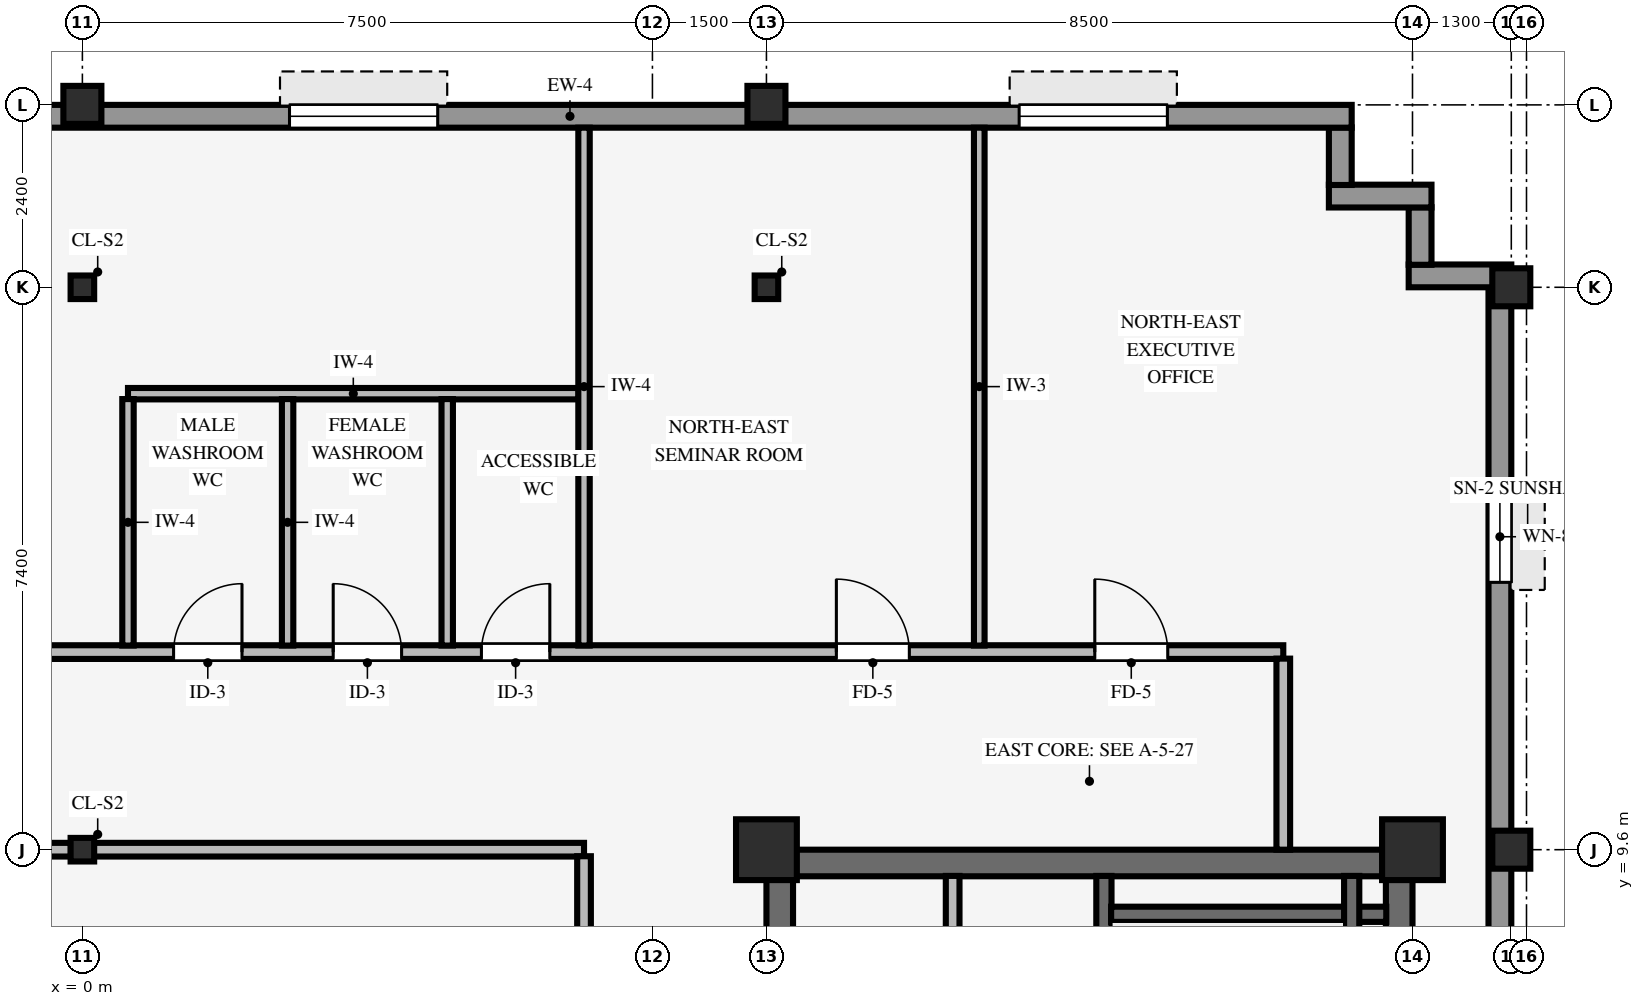
"""IFC4 building model, lengths in metres.
Left out: names, types, materials, properties, quantities, classifications, styles, units other than length and angle.
Written with IfcOpenShell. Run it as: python <this file> out.ifc"""

import sys

from ifc_helpers import new_model, si_unit, direction, frame, frame_2d, origin, origin_2d, place, context, subcontext, project, spatial, rectangle, hollow_rectangle, i_section, extrude, source, transform, mapped, element, fill, save


model = new_model("IFC4")
c1 = context("Model", 3, precision=1e-05, world=origin(), true_north=direction((0.0, 1.0)))
c2 = subcontext(c1, "Body", "Model", "MODEL_VIEW")
j1 = project(units=[si_unit("LENGTHUNIT", "METRE"), si_unit("PLANEANGLEUNIT", "RADIAN")], contexts=[c1])
p1 = place(None, origin())
s1 = spatial("IfcSite", under=j1, at=p1, CompositionType="ELEMENT")
p2 = place(p1, origin())
s2 = spatial("IfcBuilding", under=s1, at=p2, CompositionType="ELEMENT")
p3 = place(p2, frame((0.0, 0.0, 279.85)))
s3 = spatial("IfcBuildingStorey", under=s2, at=p3, CompositionType="ELEMENT", Elevation=279.85)
p4 = place(p3, frame((9.0, 9.425, 0.0), z_axis=(0.0, 0.0, 1.0), x_axis=(1.0, 0.0, 0.0)))
e1 = element("IfcWall", 1, at=p4, inside=s3, PredefinedType="SHEAR", context=c2, shape_type="SweptSolid", body=[
    extrude(rectangle(XDim=8.5, YDim=0.35, at=frame_2d((4.25, 0.0))), origin(), (0.0, 0.0, 1.0), 3.37),
])
p5 = place(p3, frame((9.175, -9.255, 0.0), z_axis=(0.0, 0.0, 1.0), x_axis=(0.0, 1.0, 0.0)))
e2 = element("IfcWall", 2, at=p5, inside=s3, PredefinedType="SHEAR", context=c2, shape_type="SweptSolid", body=[
    extrude(rectangle(XDim=18.51, YDim=0.35, at=frame_2d((9.255, 0.0))), origin(), (0.0, 0.0, 1.0), 3.37),
])
p6 = place(p5, frame((8.655, 0.0, 0.0)))
e3 = element("IfcOpeningElement", 3, at=p6, cuts=e2, PredefinedType="OPENING", context=c2, shape_type="SweptSolid", body=[
    extrude(rectangle(XDim=1.2, YDim=2.15, at=frame_2d((0.6, 1.075))), frame((0.0, 0.185, 0.0), z_axis=(0.0, -1.0, 0.0), x_axis=(1.0, 0.0, 0.0)), (0.0, 0.0, 1.0), 0.37),
])
p7 = place(p3, frame((17.325, -9.255, 0.0), z_axis=(0.0, 0.0, 1.0), x_axis=(0.0, 1.0, 0.0)))
e4 = element("IfcWall", 4, at=p7, inside=s3, PredefinedType="SHEAR", context=c2, shape_type="SweptSolid", body=[
    extrude(rectangle(XDim=18.51, YDim=0.35, at=frame_2d((9.255, 0.0))), origin(), (0.0, 0.0, 1.0), 3.37),
])
for number, where, z_axis, x_axis in (
    (5, (9.0, 9.6, 0.0), (0.0, 0.0, 1.0), (1.0, 0.0, 0.0)),
    (6, (17.5, 9.6, 0.0), (0.0, 0.0, 1.0), (1.0, 0.0, 0.0)),
):
    element("IfcColumn", number, at=place(p3, frame(where, z_axis=z_axis, x_axis=x_axis)), inside=s3, PredefinedType="COLUMN", context=c2, shape_type="SweptSolid", body=[
        extrude(rectangle(XDim=0.8, YDim=0.8, at=origin_2d()), origin(), (0.0, 0.0, 1.0), 3.37),
    ])
for number, where, z_axis, x_axis in (
    (7, (18.8, 9.6, 0.0), (0.0, 0.0, 1.0), (1.0, 0.0, 0.0)),
    (8, (18.8, 17.0, 0.0), (0.0, 0.0, 1.0), (1.0, 0.0, 0.0)),
    (9, (0.0, 19.4, 0.0), (0.0, 0.0, 1.0), (1.0, 0.0, 0.0)),
    (10, (9.0, 19.4, 0.0), (0.0, 0.0, 1.0), (1.0, 0.0, 0.0)),
):
    element("IfcColumn", number, at=place(p3, frame(where, z_axis=z_axis, x_axis=x_axis)), inside=s3, PredefinedType="COLUMN", context=c2, shape_type="SweptSolid", body=[
        extrude(hollow_rectangle(XDim=0.5, YDim=0.5, WallThickness=0.032, InnerFilletRadius=0.032, OuterFilletRadius=0.064, at=origin_2d()), origin(), (0.0, 0.0, 1.0), 3.37),
    ])
for number, where, z_axis, x_axis in (
    (11, (0.0, 9.6, 0.0), (0.0, 0.0, 1.0), (1.0, 0.0, 0.0)),
    (12, (0.0, 17.0, 0.0), (0.0, 0.0, 1.0), (1.0, 0.0, 0.0)),
    (13, (9.0, 17.0, 0.0), (0.0, 0.0, 1.0), (1.0, 0.0, 0.0)),
):
    element("IfcColumn", number, at=place(p3, frame(where, z_axis=z_axis, x_axis=x_axis)), inside=s3, PredefinedType="COLUMN", context=c2, shape_type="SweptSolid", body=[
        extrude(i_section(OverallWidth=0.31, OverallDepth=0.31, WebThickness=0.015, FlangeThickness=0.015, FilletRadius=0.015, at=origin_2d()), origin(), (0.0, 0.0, 1.0), 3.37),
    ])
p8 = place(p3, frame((18.65, -17.004, 0.0), z_axis=(0.0, 0.0, 1.0), x_axis=(0.0, 1.0, 0.0)))
e14 = element("IfcWall", 14, at=p8, inside=s3, PredefinedType="STANDARD", context=c2, shape_type="SweptSolid", body=[
    extrude(rectangle(XDim=34.008, YDim=0.3, at=frame_2d((17.004, 0.0))), origin(), (0.0, 0.0, 1.0), 2.705),
])
p9 = place(p8, frame((2.686, 0.0, 0.8)))
e15 = element("IfcOpeningElement", 15, at=p9, cuts=e14, PredefinedType="OPENING", context=c2, shape_type="SweptSolid", body=[
    extrude(rectangle(XDim=1.2, YDim=1.48, at=frame_2d((0.6, 0.74))), frame((0.0, 0.16, 0.0), z_axis=(0.0, -1.0, 0.0), x_axis=(1.0, 0.0, 0.0)), (0.0, 0.0, 1.0), 0.32),
])
p10 = place(p8, frame((30.122, 0.0, 0.8)))
e16 = element("IfcOpeningElement", 16, at=p10, cuts=e14, PredefinedType="OPENING", context=c2, shape_type="SweptSolid", body=[
    extrude(rectangle(XDim=1.2, YDim=1.48, at=frame_2d((0.6, 0.74))), frame((0.0, 0.16, 0.0), z_axis=(0.0, -1.0, 0.0), x_axis=(1.0, 0.0, 0.0)), (0.0, 0.0, 1.0), 0.32),
])
p11 = place(p3, frame((17.45, 17.15, 0.0), z_axis=(0.0, 0.0, 1.0), x_axis=(1.0, 0.0, 0.0)))
e17 = element("IfcWall", 17, at=p11, inside=s3, PredefinedType="STANDARD", context=c2, shape_type="SweptSolid", body=[
    extrude(rectangle(XDim=1.35, YDim=0.3, at=frame_2d((0.675, 0.0))), origin(), (0.0, 0.0, 1.0), 2.892),
])
p12 = place(p3, frame((17.6, 17.296, 0.0), z_axis=(0.0, 0.0, 1.0), x_axis=(0.0, 1.0, 0.0)))
e18 = element("IfcWall", 18, at=p12, inside=s3, PredefinedType="STANDARD", context=c2, shape_type="SweptSolid", body=[
    extrude(rectangle(XDim=0.758, YDim=0.3, at=frame_2d((0.379, 0.0))), origin(), (0.0, 0.0, 1.0), 2.892),
])
p13 = place(p3, frame((16.4, 18.2, 0.0), z_axis=(0.0, 0.0, 1.0), x_axis=(1.0, 0.0, 0.0)))
e19 = element("IfcWall", 19, at=p13, inside=s3, PredefinedType="STANDARD", context=c2, shape_type="SweptSolid", body=[
    extrude(rectangle(XDim=1.35, YDim=0.3, at=frame_2d((0.675, 0.0))), origin(), (0.0, 0.0, 1.0), 2.892),
])
p14 = place(p3, frame((16.55, 18.346, 0.0), z_axis=(0.0, 0.0, 1.0), x_axis=(0.0, 1.0, 0.0)))
e20 = element("IfcWall", 20, at=p14, inside=s3, PredefinedType="STANDARD", context=c2, shape_type="SweptSolid", body=[
    extrude(rectangle(XDim=0.758, YDim=0.3, at=frame_2d((0.379, 0.0))), origin(), (0.0, 0.0, 1.0), 2.892),
])
p15 = place(p3, frame((-18.9, 19.25, 0.0), z_axis=(0.0, 0.0, 1.0), x_axis=(1.0, 0.0, 0.0)))
e21 = element("IfcWall", 21, at=p15, inside=s3, PredefinedType="STANDARD", context=c2, shape_type="SweptSolid", body=[
    extrude(rectangle(XDim=35.6, YDim=0.3, at=frame_2d((17.8, 0.0))), origin(), (0.0, 0.0, 1.0), 2.705),
])
p16 = place(p15, frame((13.6, 0.0, 0.0)))
e22 = element("IfcOpeningElement", 22, at=p16, cuts=e21, PredefinedType="OPENING", context=c2, shape_type="SweptSolid", body=[
    extrude(rectangle(XDim=0.98, YDim=2.15, at=frame_2d((0.49, 1.075))), frame((0.0, 0.16, 0.0), z_axis=(0.0, -1.0, 0.0), x_axis=(1.0, 0.0, 0.0)), (0.0, 0.0, 1.0), 0.32),
])
p17 = place(p15, frame((2.425, 0.0, 0.8)))
e23 = element("IfcOpeningElement", 23, at=p17, cuts=e21, PredefinedType="OPENING", context=c2, shape_type="SweptSolid", body=[
    extrude(rectangle(XDim=1.95, YDim=1.48, at=frame_2d((0.975, 0.74))), frame((0.0, 0.16, 0.0), z_axis=(0.0, -1.0, 0.0), x_axis=(1.0, 0.0, 0.0)), (0.0, 0.0, 1.0), 0.32),
])
p18 = place(p15, frame((7.225, 0.0, 0.8)))
e24 = element("IfcOpeningElement", 24, at=p18, cuts=e21, PredefinedType="OPENING", context=c2, shape_type="SweptSolid", body=[
    extrude(rectangle(XDim=1.95, YDim=1.48, at=frame_2d((0.975, 0.74))), frame((0.0, 0.16, 0.0), z_axis=(0.0, -1.0, 0.0), x_axis=(1.0, 0.0, 0.0)), (0.0, 0.0, 1.0), 0.32),
])
p19 = place(p15, frame((15.925, 0.0, 0.8)))
e25 = element("IfcOpeningElement", 25, at=p19, cuts=e21, PredefinedType="OPENING", context=c2, shape_type="SweptSolid", body=[
    extrude(rectangle(XDim=1.95, YDim=1.48, at=frame_2d((0.975, 0.74))), frame((0.0, 0.16, 0.0), z_axis=(0.0, -1.0, 0.0), x_axis=(1.0, 0.0, 0.0)), (0.0, 0.0, 1.0), 0.32),
])
p20 = place(p15, frame((21.625, 0.0, 0.8)))
e26 = element("IfcOpeningElement", 26, at=p20, cuts=e21, PredefinedType="OPENING", context=c2, shape_type="SweptSolid", body=[
    extrude(rectangle(XDim=1.95, YDim=1.48, at=frame_2d((0.975, 0.74))), frame((0.0, 0.16, 0.0), z_axis=(0.0, -1.0, 0.0), x_axis=(1.0, 0.0, 0.0)), (0.0, 0.0, 1.0), 0.32),
])
p21 = place(p15, frame((31.225, 0.0, 0.8)))
e27 = element("IfcOpeningElement", 27, at=p21, cuts=e21, PredefinedType="OPENING", context=c2, shape_type="SweptSolid", body=[
    extrude(rectangle(XDim=1.95, YDim=1.48, at=frame_2d((0.975, 0.74))), frame((0.0, 0.16, 0.0), z_axis=(0.0, -1.0, 0.0), x_axis=(1.0, 0.0, 0.0)), (0.0, 0.0, 1.0), 0.32),
])
p22 = place(p3, frame((13.44, 0.9, 0.0), z_axis=(0.0, 0.0, 1.0), x_axis=(0.0, 1.0, 0.0)))
e28 = element("IfcWall", 28, at=p22, inside=s3, PredefinedType="SHEAR", context=c2, shape_type="SweptSolid", body=[
    extrude(rectangle(XDim=8.355, YDim=0.2, at=frame_2d((4.177, 0.0))), origin(), (0.0, 0.0, 1.0), 3.37),
])
p23 = place(p22, frame((0.43, 0.0, 0.0)))
e29 = element("IfcOpeningElement", 29, at=p23, cuts=e28, PredefinedType="OPENING", context=c2, shape_type="SweptSolid", body=[
    extrude(rectangle(XDim=1.1, YDim=2.15, at=frame_2d((0.55, 1.075))), frame((0.0, 0.11, 0.0), z_axis=(0.0, -1.0, 0.0), x_axis=(1.0, 0.0, 0.0)), (0.0, 0.0, 1.0), 0.22),
])
p24 = place(p3, frame((13.535, 8.75, 0.0), z_axis=(0.0, 0.0, 1.0), x_axis=(1.0, 0.0, 0.0)))
e30 = element("IfcWall", 30, at=p24, inside=s3, PredefinedType="SHEAR", context=c2, shape_type="SweptSolid", body=[
    extrude(rectangle(XDim=3.62, YDim=0.2, at=frame_2d((1.81, 0.0))), origin(), (0.0, 0.0, 1.0), 3.37),
])
p25 = place(p3, frame((16.7, 1.095, 0.0), z_axis=(0.0, 0.0, 1.0), x_axis=(0.0, 1.0, 0.0)))
e31 = element("IfcWall", 31, at=p25, inside=s3, PredefinedType="SHEAR", context=c2, shape_type="SweptSolid", body=[
    extrude(rectangle(XDim=8.16, YDim=0.2, at=frame_2d((4.08, 0.0))), origin(), (0.0, 0.0, 1.0), 3.37),
])
p26 = place(p3, frame((11.45, 1.49, 0.0), z_axis=(0.0, 0.0, 1.0), x_axis=(0.0, 1.0, 0.0)))
e32 = element("IfcWall", 32, at=p26, inside=s3, PredefinedType="PARTITIONING", context=c2, shape_type="SweptSolid", body=[
    extrude(rectangle(XDim=7.765, YDim=0.18, at=frame_2d((3.882, 0.0))), origin(), (0.0, 0.0, 1.0), 3.36),
])
for number, where, z_axis, x_axis in (
    (33, (-6.6, 9.6, 0.0), (0.0, 0.0, 1.0), (1.0, 0.0, 0.0)),
    (34, (0.151, 9.6, 0.0), (0.0, 0.0, 1.0), (1.0, 0.0, 0.0)),
):
    element("IfcWall", number, at=place(p3, frame(where, z_axis=z_axis, x_axis=x_axis)), inside=s3, PredefinedType="PARTITIONING", context=c2, shape_type="SweptSolid", body=[
        extrude(rectangle(XDim=6.449, YDim=0.18, at=frame_2d((3.225, 0.0))), origin(), (0.0, 0.0, 1.0), 2.405),
    ])
p27 = place(p3, frame((-15.0, 12.2, 0.0), z_axis=(0.0, 0.0, 1.0), x_axis=(1.0, 0.0, 0.0)))
e35 = element("IfcWall", 35, at=p27, inside=s3, PredefinedType="PARTITIONING", context=c2, shape_type="SweptSolid", body=[
    extrude(rectangle(XDim=30.8, YDim=0.18, at=frame_2d((15.4, 0.0))), origin(), (0.0, 0.0, 1.0), 3.36),
])
p28 = place(p27, frame((11.52, 0.0, 0.0)))
e36 = element("IfcOpeningElement", 36, at=p28, cuts=e35, PredefinedType="OPENING", context=c2, shape_type="SweptSolid", body=[
    extrude(rectangle(XDim=0.96, YDim=2.1, at=frame_2d((0.48, 1.05))), frame((0.0, 0.1, 0.0), z_axis=(0.0, -1.0, 0.0), x_axis=(1.0, 0.0, 0.0)), (0.0, 0.0, 1.0), 0.2),
])
p29 = place(p27, frame((2.52, 0.0, 0.0)))
e37 = element("IfcOpeningElement", 37, at=p29, cuts=e35, PredefinedType="OPENING", context=c2, shape_type="SweptSolid", body=[
    extrude(rectangle(XDim=0.96, YDim=2.1, at=frame_2d((0.48, 1.05))), frame((0.0, 0.1, 0.0), z_axis=(0.0, -1.0, 0.0), x_axis=(1.0, 0.0, 0.0)), (0.0, 0.0, 1.0), 0.2),
])
p30 = place(p27, frame((28.32, 0.0, 0.0)))
e38 = element("IfcOpeningElement", 38, at=p30, cuts=e35, PredefinedType="OPENING", context=c2, shape_type="SweptSolid", body=[
    extrude(rectangle(XDim=0.96, YDim=2.1, at=frame_2d((0.48, 1.05))), frame((0.0, 0.1, 0.0), z_axis=(0.0, -1.0, 0.0), x_axis=(1.0, 0.0, 0.0)), (0.0, 0.0, 1.0), 0.2),
])
p31 = place(p27, frame((24.92, 0.0, 0.0)))
e39 = element("IfcOpeningElement", 39, at=p31, cuts=e35, PredefinedType="OPENING", context=c2, shape_type="SweptSolid", body=[
    extrude(rectangle(XDim=0.96, YDim=2.1, at=frame_2d((0.48, 1.05))), frame((0.0, 0.1, 0.0), z_axis=(0.0, -1.0, 0.0), x_axis=(1.0, 0.0, 0.0)), (0.0, 0.0, 1.0), 0.2),
])
p32 = place(p27, frame((16.2, 0.0, 0.0)))
e40 = element("IfcOpeningElement", 40, at=p32, cuts=e35, PredefinedType="OPENING", context=c2, shape_type="SweptSolid", body=[
    extrude(rectangle(XDim=0.9, YDim=2.1, at=frame_2d((0.45, 1.05))), frame((0.0, 0.1, 0.0), z_axis=(0.0, -1.0, 0.0), x_axis=(1.0, 0.0, 0.0)), (0.0, 0.0, 1.0), 0.2),
])
p33 = place(p27, frame((18.3, 0.0, 0.0)))
e41 = element("IfcOpeningElement", 41, at=p33, cuts=e35, PredefinedType="OPENING", context=c2, shape_type="SweptSolid", body=[
    extrude(rectangle(XDim=0.9, YDim=2.1, at=frame_2d((0.45, 1.05))), frame((0.0, 0.1, 0.0), z_axis=(0.0, -1.0, 0.0), x_axis=(1.0, 0.0, 0.0)), (0.0, 0.0, 1.0), 0.2),
])
p34 = place(p27, frame((20.25, 0.0, 0.0)))
e42 = element("IfcOpeningElement", 42, at=p34, cuts=e35, PredefinedType="OPENING", context=c2, shape_type="SweptSolid", body=[
    extrude(rectangle(XDim=0.9, YDim=2.1, at=frame_2d((0.45, 1.05))), frame((0.0, 0.1, 0.0), z_axis=(0.0, -1.0, 0.0), x_axis=(1.0, 0.0, 0.0)), (0.0, 0.0, 1.0), 0.2),
])
p35 = place(p3, frame((0.6, 15.6, 0.0), z_axis=(0.0, 0.0, 1.0), x_axis=(1.0, 0.0, 0.0)))
e43 = element("IfcWall", 43, at=p35, inside=s3, PredefinedType="PARTITIONING", context=c2, shape_type="SweptSolid", body=[
    extrude(rectangle(XDim=5.929, YDim=0.15, at=frame_2d((2.964, 0.0))), origin(), (0.0, 0.0, 1.0), 3.36),
])
for number, where, z_axis, x_axis in (
    (44, (0.6, 12.286, 0.0), (0.0, 0.0, 1.0), (0.0, 1.0, 0.0)),
    (45, (2.7, 12.286, 0.0), (0.0, 0.0, 1.0), (0.0, 1.0, 0.0)),
    (46, (4.8, 12.286, 0.0), (0.0, 0.0, 1.0), (0.0, 1.0, 0.0)),
):
    element("IfcWall", number, at=place(p3, frame(where, z_axis=z_axis, x_axis=x_axis)), inside=s3, PredefinedType="PARTITIONING", context=c2, shape_type="SweptSolid", body=[
        extrude(rectangle(XDim=3.243, YDim=0.15, at=frame_2d((1.622, 0.0))), origin(), (0.0, 0.0, 1.0), 3.36),
    ])
p36 = place(p3, frame((6.6, 1.336, 0.0), z_axis=(0.0, 0.0, 1.0), x_axis=(0.0, 1.0, 0.0)))
e47 = element("IfcWall", 47, at=p36, inside=s3, PredefinedType="PARTITIONING", context=c2, shape_type="SweptSolid", body=[
    extrude(rectangle(XDim=8.178, YDim=0.18, at=frame_2d((4.089, 0.0))), origin(), (0.0, 0.0, 1.0), 3.36),
])
p37 = place(p36, frame((3.609, 0.0, 0.0)))
e48 = element("IfcOpeningElement", 48, at=p37, cuts=e47, PredefinedType="OPENING", context=c2, shape_type="SweptSolid", body=[
    extrude(rectangle(XDim=0.96, YDim=2.1, at=frame_2d((0.48, 1.05))), frame((0.0, 0.1, 0.0), z_axis=(0.0, -1.0, 0.0), x_axis=(1.0, 0.0, 0.0)), (0.0, 0.0, 1.0), 0.2),
])
p38 = place(p3, frame((6.6, 12.286, 0.0), z_axis=(0.0, 0.0, 1.0), x_axis=(0.0, 1.0, 0.0)))
e49 = element("IfcWall", 49, at=p38, inside=s3, PredefinedType="PARTITIONING", context=c2, shape_type="SweptSolid", body=[
    extrude(rectangle(XDim=6.814, YDim=0.15, at=frame_2d((3.407, 0.0))), origin(), (0.0, 0.0, 1.0), 3.36),
])
p39 = place(p3, frame((11.8, 12.286, 0.0), z_axis=(0.0, 0.0, 1.0), x_axis=(0.0, 1.0, 0.0)))
e50 = element("IfcWall", 50, at=p39, inside=s3, PredefinedType="PARTITIONING", context=c2, shape_type="SweptSolid", body=[
    extrude(rectangle(XDim=6.814, YDim=0.14, at=frame_2d((3.407, 0.0))), origin(), (0.0, 0.0, 1.0), 3.36),
])
p40 = place(p3, frame((15.8, 9.6, 0.0), z_axis=(0.0, 0.0, 1.0), x_axis=(0.0, 1.0, 0.0)))
e51 = element("IfcWall", 51, at=p40, inside=s3, PredefinedType="PARTITIONING", context=c2, shape_type="SweptSolid", body=[
    extrude(rectangle(XDim=2.514, YDim=0.18, at=frame_2d((1.257, 0.0))), origin(), (0.0, 0.0, 1.0), 3.36),
])
m1 = source(origin(), c2, "Body", "SweptSolid", [
    extrude(rectangle(XDim=1.2, YDim=1.48, at=frame_2d((0.6, 0.74))), frame((0.0, 0.03, 0.0), z_axis=(0.0, -1.0, 0.0), x_axis=(1.0, 0.0, 0.0)), (0.0, 0.0, 1.0), 0.06),
])
p41 = place(p10, origin())
e52 = element("IfcWindow", 52, at=p41, inside=s3, PartitioningType="SINGLE_PANEL", PredefinedType="WINDOW", context=c2, shape_type="MappedRepresentation", body=[
    mapped(m1, transform((0.0, 0.0, 0.0), scale=1.0)),
])
fill(e16, e52)
m2 = source(origin(), c2, "Body", "SweptSolid", [
    extrude(rectangle(XDim=1.95, YDim=1.48, at=frame_2d((0.975, 0.74))), frame((0.0, 0.03, 0.0), z_axis=(0.0, -1.0, 0.0), x_axis=(1.0, 0.0, 0.0)), (0.0, 0.0, 1.0), 0.06),
])
p42 = place(p20, origin())
e53 = element("IfcWindow", 53, at=p42, inside=s3, PartitioningType="SINGLE_PANEL", PredefinedType="WINDOW", context=c2, shape_type="MappedRepresentation", body=[
    mapped(m2, transform((0.0, 0.0, 0.0), scale=1.0)),
])
fill(e26, e53)
p43 = place(p21, origin())
e54 = element("IfcWindow", 54, at=p43, inside=s3, PartitioningType="SINGLE_PANEL", PredefinedType="WINDOW", context=c2, shape_type="MappedRepresentation", body=[
    mapped(m2, transform((0.0, 0.0, 0.0), scale=1.0)),
])
fill(e27, e54)
m3 = source(origin(), c2, "Body", "SweptSolid", [
    extrude(rectangle(XDim=0.96, YDim=2.1, at=frame_2d((0.48, 1.05))), frame((0.0, 0.025, 0.0), z_axis=(0.0, -1.0, 0.0), x_axis=(1.0, 0.0, 0.0)), (0.0, 0.0, 1.0), 0.05),
])
p44 = place(p30, origin())
e55 = element("IfcDoor", 55, at=p44, inside=s3, OperationType="SINGLE_SWING_LEFT", PredefinedType="DOOR", context=c2, shape_type="MappedRepresentation", body=[
    mapped(m3, transform((0.0, 0.0, 0.0), scale=1.0)),
])
fill(e38, e55)
p45 = place(p31, origin())
e56 = element("IfcDoor", 56, at=p45, inside=s3, OperationType="SINGLE_SWING_LEFT", PredefinedType="DOOR", context=c2, shape_type="MappedRepresentation", body=[
    mapped(m3, transform((0.0, 0.0, 0.0), scale=1.0)),
])
fill(e39, e56)
m4 = source(origin(), c2, "Body", "SweptSolid", [
    extrude(rectangle(XDim=0.9, YDim=2.1, at=frame_2d((0.45, 1.05))), frame((0.0, 0.025, 0.0), z_axis=(0.0, -1.0, 0.0), x_axis=(1.0, 0.0, 0.0)), (0.0, 0.0, 1.0), 0.05),
])
p46 = place(p32, origin())
e57 = element("IfcDoor", 57, at=p46, inside=s3, OperationType="SINGLE_SWING_RIGHT", PredefinedType="DOOR", context=c2, shape_type="MappedRepresentation", body=[
    mapped(m4, transform((0.0, 0.0, 0.0), scale=1.0)),
])
fill(e40, e57)
p47 = place(p33, origin())
e58 = element("IfcDoor", 58, at=p47, inside=s3, OperationType="SINGLE_SWING_LEFT", PredefinedType="DOOR", context=c2, shape_type="MappedRepresentation", body=[
    mapped(m4, transform((0.0, 0.0, 0.0), scale=1.0)),
])
fill(e41, e58)
p48 = place(p34, origin())
e59 = element("IfcDoor", 59, at=p48, inside=s3, OperationType="SINGLE_SWING_RIGHT", PredefinedType="DOOR", context=c2, shape_type="MappedRepresentation", body=[
    mapped(m4, transform((0.0, 0.0, 0.0), scale=1.0)),
])
fill(e42, e59)
save(model, sys.argv[1])
